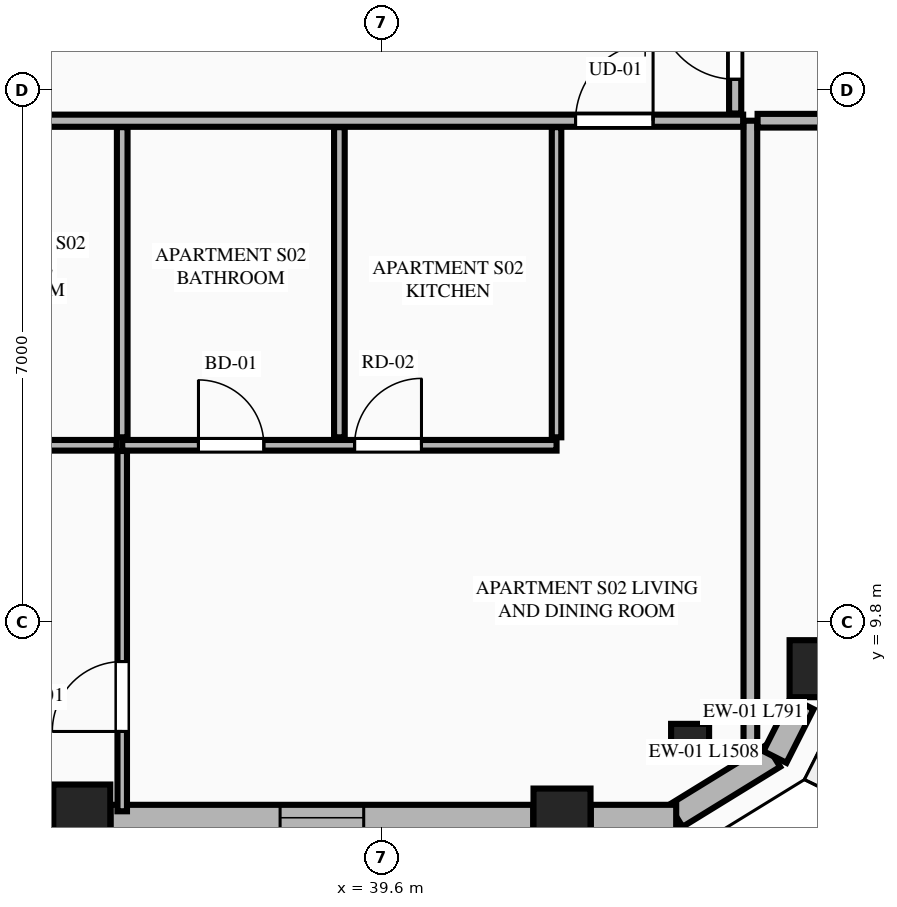
"""IFC4 building model, lengths in metres.
Left out: names, types, materials, properties, quantities, classifications, styles, units other than length and angle.
Written with IfcOpenShell. Run it as: python <this file> out.ifc"""

import sys

from ifc_helpers import new_model, si_unit, direction, frame, frame_2d, origin, origin_2d, place, context, subcontext, project, spatial, rectangle, extrude, element, fill, save


model = new_model("IFC4")
c1 = context("Model", 3, precision=1e-05, world=origin(), true_north=direction((0.0, 1.0)))
c2 = subcontext(c1, "Body", "Model", "MODEL_VIEW")
j1 = project(units=[si_unit("LENGTHUNIT", "METRE"), si_unit("PLANEANGLEUNIT", "RADIAN")], contexts=[c1])
p1 = place(None, origin())
s1 = spatial("IfcSite", under=j1, at=p1, CompositionType="ELEMENT")
p2 = place(p1, origin())
s2 = spatial("IfcBuilding", under=s1, at=p2, CompositionType="ELEMENT")
p3 = place(p2, frame((0.0, 0.0, 230.65)))
s3 = spatial("IfcBuildingStorey", under=s2, at=p3, CompositionType="ELEMENT", Elevation=230.65)
for number, where, z_axis, x_axis in (
    (1, (35.654, 7.292, 0.0), (0.0, 0.0, 1.0), (1.0, 0.0, 0.0)),
    (2, (41.972, 7.239, 0.0), (0.0, 0.0, 1.0), (1.0, 0.0, 0.0)),
    (3, (45.341, 9.191, 0.0), (0.0, 0.0, 1.0), (1.0, 0.0, 0.0)),
):
    element("IfcColumn", number, at=place(p3, frame(where, z_axis=z_axis, x_axis=x_axis)), inside=s3, PredefinedType="COLUMN", context=c2, shape_type="SweptSolid", body=[
        extrude(rectangle(XDim=0.75, YDim=0.75, at=origin_2d()), origin(), (0.0, 0.0, 1.0), 3.65),
    ])
p4 = place(p3, frame((43.657, 8.215, 0.0), z_axis=(0.0, 0.0, 1.0), x_axis=(0.865256437757, 0.501329529272, 0.0)))
e4 = element("IfcColumn", 4, at=p4, inside=s3, PredefinedType="PILASTER", context=c2, shape_type="SweptSolid", body=[
    extrude(rectangle(XDim=0.5, YDim=0.35, at=origin_2d()), origin(), (0.0, 0.0, 1.0), 3.65),
])
p5 = place(p3, frame((43.469, 7.255, 0.0), z_axis=(0.0, 0.0, 1.0), x_axis=(0.851680557619, 0.52406128246, 0.0)))
e5 = element("IfcWall", 5, at=p5, inside=s3, PredefinedType="STANDARD", context=c2, shape_type="SweptSolid", body=[
    extrude(rectangle(XDim=1.508, YDim=0.34, at=frame_2d((0.754, 0.0))), origin(), (0.0, 0.0, 1.0), 3.45),
])
p6 = place(p3, frame((29.525, 7.23, 0.0), z_axis=(0.0, 0.0, 1.0), x_axis=(1.0, 0.0, 0.0)))
e6 = element("IfcWall", 6, at=p6, inside=s3, PredefinedType="STANDARD", context=c2, shape_type="SweptSolid", body=[
    extrude(rectangle(XDim=5.75, YDim=0.34, at=frame_2d((2.875, 0.0))), origin(), (0.0, 0.0, 1.0), 2.983),
])
p7 = place(p6, frame((2.325, 0.0, 0.0)))
e7 = element("IfcOpeningElement", 7, at=p7, cuts=e6, PredefinedType="OPENING", context=c2, shape_type="SweptSolid", body=[
    extrude(rectangle(XDim=1.1, YDim=2.25, at=frame_2d((0.55, 1.125))), frame((0.0, 0.18, 0.0), z_axis=(0.0, -1.0, 0.0), x_axis=(1.0, 0.0, 0.0)), (0.0, 0.0, 1.0), 0.36),
])
p8 = place(p3, frame((36.033, 7.23, 0.0), z_axis=(0.0, 0.0, 1.0), x_axis=(1.0, 0.0, 0.0)))
e8 = element("IfcWall", 8, at=p8, inside=s3, PredefinedType="STANDARD", context=c2, shape_type="SweptSolid", body=[
    extrude(rectangle(XDim=5.56, YDim=0.34, at=frame_2d((2.78, 0.0))), origin(), (0.0, 0.0, 1.0), 2.983),
])
p9 = place(p8, frame((2.23, 0.0, 0.75)))
e9 = element("IfcOpeningElement", 9, at=p9, cuts=e8, PredefinedType="OPENING", context=c2, shape_type="SweptSolid", body=[
    extrude(rectangle(XDim=1.1, YDim=2.0, at=frame_2d((0.55, 1.0))), frame((0.0, 0.18, 0.0), z_axis=(0.0, -1.0, 0.0), x_axis=(1.0, 0.0, 0.0)), (0.0, 0.0, 1.0), 0.36),
])
p10 = place(p3, frame((42.351, 7.23, 0.0), z_axis=(0.0, 0.0, 1.0), x_axis=(1.0, 0.0, 0.0)))
e10 = element("IfcWall", 10, at=p10, inside=s3, PredefinedType="STANDARD", context=c2, shape_type="SweptSolid", body=[
    extrude(rectangle(XDim=1.123, YDim=0.34, at=frame_2d((0.562, 0.0))), origin(), (0.0, 0.0, 1.0), 3.45),
])
p11 = place(p3, frame((44.773, 8.029, 0.0), z_axis=(0.0, 0.0, 1.0), x_axis=(0.451159191899, 0.892443490404, 0.0)))
e11 = element("IfcWall", 11, at=p11, inside=s3, PredefinedType="STANDARD", context=c2, shape_type="SweptSolid", body=[
    extrude(rectangle(XDim=0.791, YDim=0.34, at=frame_2d((0.396, 0.0))), origin(), (0.0, 0.0, 1.0), 3.45),
])
p12 = place(p3, frame((44.45, 8.119, 0.0), z_axis=(0.0, 0.0, 1.0), x_axis=(0.0, 1.0, 0.0)))
e12 = element("IfcWall", 12, at=p12, inside=s3, PredefinedType="PARTITIONING", context=c2, shape_type="SweptSolid", body=[
    extrude(rectangle(XDim=8.281, YDim=0.18, at=frame_2d((4.141, 0.0))), origin(), (0.0, 0.0, 1.0), 3.45),
])
p13 = place(p3, frame((29.241, 16.4, 0.0), z_axis=(0.0, 0.0, 1.0), x_axis=(1.0, 0.0, 0.0)))
e13 = element("IfcWall", 13, at=p13, inside=s3, PredefinedType="PARTITIONING", context=c2, shape_type="SweptSolid", body=[
    extrude(rectangle(XDim=15.114, YDim=0.16, at=frame_2d((7.557, 0.0))), origin(), (0.0, 0.0, 1.0), 3.45),
])
p14 = place(p13, frame((12.909, 0.0, 0.0)))
e14 = element("IfcOpeningElement", 14, at=p14, cuts=e13, PredefinedType="OPENING", context=c2, shape_type="SweptSolid", body=[
    extrude(rectangle(XDim=1.02, YDim=2.25, at=frame_2d((0.51, 1.125))), frame((0.0, 0.09, 0.0), z_axis=(0.0, -1.0, 0.0), x_axis=(1.0, 0.0, 0.0)), (0.0, 0.0, 1.0), 0.18),
])
p15 = place(p3, frame((41.9, 12.235, 0.0), z_axis=(0.0, 0.0, 1.0), x_axis=(0.0, 1.0, 0.0)))
e15 = element("IfcWall", 15, at=p15, inside=s3, PredefinedType="PARTITIONING", context=c2, shape_type="SweptSolid", body=[
    extrude(rectangle(XDim=4.08, YDim=0.125, at=frame_2d((2.04, 0.0))), origin(), (0.0, 0.0, 1.0), 2.907),
])
p16 = place(p3, frame((36.186, 12.13, 0.0), z_axis=(0.0, 0.0, 1.0), x_axis=(1.0, 0.0, 0.0)))
e16 = element("IfcWall", 16, at=p16, inside=s3, PredefinedType="PLUMBINGWALL", context=c2, shape_type="SweptSolid", body=[
    extrude(rectangle(XDim=5.714, YDim=0.14, at=frame_2d((2.857, 0.0))), origin(), (0.0, 0.0, 1.0), 3.45),
])
p17 = place(p16, frame((1.003, 0.0, 0.0)))
e17 = element("IfcOpeningElement", 17, at=p17, cuts=e16, PredefinedType="OPENING", context=c2, shape_type="SweptSolid", body=[
    extrude(rectangle(XDim=0.86, YDim=2.1, at=frame_2d((0.43, 1.05))), frame((0.0, 0.08, 0.0), z_axis=(0.0, -1.0, 0.0), x_axis=(1.0, 0.0, 0.0)), (0.0, 0.0, 1.0), 0.16),
])
p18 = place(p16, frame((3.057, 0.0, 0.0)))
e18 = element("IfcOpeningElement", 18, at=p18, cuts=e16, PredefinedType="OPENING", context=c2, shape_type="SweptSolid", body=[
    extrude(rectangle(XDim=0.88, YDim=2.15, at=frame_2d((0.44, 1.075))), frame((0.0, 0.08, 0.0), z_axis=(0.0, -1.0, 0.0), x_axis=(1.0, 0.0, 0.0)), (0.0, 0.0, 1.0), 0.16),
])
p19 = place(p3, frame((29.241, 12.13, 0.0), z_axis=(0.0, 0.0, 1.0), x_axis=(1.0, 0.0, 0.0)))
e19 = element("IfcWall", 19, at=p19, inside=s3, PredefinedType="PLUMBINGWALL", context=c2, shape_type="SweptSolid", body=[
    extrude(rectangle(XDim=6.87, YDim=0.14, at=frame_2d((3.435, 0.0))), origin(), (0.0, 0.0, 1.0), 3.45),
])
p20 = place(p19, frame((0.28, 0.0, 0.0)))
e20 = element("IfcOpeningElement", 20, at=p20, cuts=e19, PredefinedType="OPENING", context=c2, shape_type="SweptSolid", body=[
    extrude(rectangle(XDim=0.88, YDim=2.15, at=frame_2d((0.44, 1.075))), frame((0.0, 0.08, 0.0), z_axis=(0.0, -1.0, 0.0), x_axis=(1.0, 0.0, 0.0)), (0.0, 0.0, 1.0), 0.16),
])
p21 = place(p19, frame((4.352, 0.0, 0.0)))
e21 = element("IfcOpeningElement", 21, at=p21, cuts=e19, PredefinedType="OPENING", context=c2, shape_type="SweptSolid", body=[
    extrude(rectangle(XDim=0.86, YDim=2.1, at=frame_2d((0.43, 1.05))), frame((0.0, 0.08, 0.0), z_axis=(0.0, -1.0, 0.0), x_axis=(1.0, 0.0, 0.0)), (0.0, 0.0, 1.0), 0.16),
])
for number, where, z_axis, x_axis in (
    (22, (39.043, 12.235, 0.0), (0.0, 0.0, 1.0), (0.0, 1.0, 0.0)),
    (23, (36.186, 12.235, 0.0), (0.0, 0.0, 1.0), (0.0, 1.0, 0.0)),
):
    element("IfcWall", number, at=place(p3, frame(where, z_axis=z_axis, x_axis=x_axis)), inside=s3, PredefinedType="PLUMBINGWALL", context=c2, shape_type="SweptSolid", body=[
        extrude(rectangle(XDim=4.08, YDim=0.14, at=frame_2d((2.04, 0.0))), origin(), (0.0, 0.0, 1.0), 3.45),
    ])
p22 = place(p3, frame((36.186, 7.315, 0.0), z_axis=(0.0, 0.0, 1.0), x_axis=(0.0, 1.0, 0.0)))
e24 = element("IfcWall", 24, at=p22, inside=s3, PredefinedType="PARTITIONING", context=c2, shape_type="SweptSolid", body=[
    extrude(rectangle(XDim=4.74, YDim=0.125, at=frame_2d((2.37, 0.0))), origin(), (0.0, 0.0, 1.0), 3.45),
])
p23 = place(p22, frame((1.05, 0.0, 0.0)))
e25 = element("IfcOpeningElement", 25, at=p23, cuts=e24, PredefinedType="OPENING", context=c2, shape_type="SweptSolid", body=[
    extrude(rectangle(XDim=0.92, YDim=2.15, at=frame_2d((0.46, 1.075))), frame((0.0, 0.073, 0.0), z_axis=(0.0, -1.0, 0.0), x_axis=(1.0, 0.0, 0.0)), (0.0, 0.0, 1.0), 0.145),
])
p24 = place(p3, frame((44.545, 16.4, 0.0), z_axis=(0.0, 0.0, 1.0), x_axis=(1.0, 0.0, 0.0)))
e26 = element("IfcWall", 26, at=p24, inside=s3, PredefinedType="PARTITIONING", context=c2, shape_type="SweptSolid", body=[
    extrude(rectangle(XDim=4.221, YDim=0.18, at=frame_2d((2.111, 0.0))), origin(), (0.0, 0.0, 1.0), 3.45),
])
p25 = place(p3, frame((44.25, 16.495, 0.0), z_axis=(0.0, 0.0, 1.0), x_axis=(0.0, 1.0, 0.0)))
e27 = element("IfcWall", 27, at=p25, inside=s3, PredefinedType="PARTITIONING", context=c2, shape_type="SweptSolid", body=[
    extrude(rectangle(XDim=18.41, YDim=0.16, at=frame_2d((9.205, 0.0))), origin(), (0.0, 0.0, 1.0), 3.137),
])
p26 = place(p25, frame((0.45, 0.0, 0.0)))
e28 = element("IfcOpeningElement", 28, at=p26, cuts=e27, PredefinedType="OPENING", context=c2, shape_type="SweptSolid", body=[
    extrude(rectangle(XDim=1.02, YDim=2.25, at=frame_2d((0.51, 1.125))), frame((0.0, 0.09, 0.0), z_axis=(0.0, -1.0, 0.0), x_axis=(1.0, 0.0, 0.0)), (0.0, 0.0, 1.0), 0.18),
])
p27 = place(p9, origin())
e29 = element("IfcWindow", 29, at=p27, inside=s3, PartitioningType="SINGLE_PANEL", PredefinedType="WINDOW", context=c2, shape_type="SweptSolid", body=[
    extrude(rectangle(XDim=1.1, YDim=2.0, at=frame_2d((0.55, 1.0))), frame((0.0, 0.03, 0.0), z_axis=(0.0, -1.0, 0.0), x_axis=(1.0, 0.0, 0.0)), (0.0, 0.0, 1.0), 0.06),
])
fill(e9, e29)
p28 = place(p17, origin())
e30 = element("IfcDoor", 30, at=p28, inside=s3, OperationType="SINGLE_SWING_LEFT", PredefinedType="DOOR", context=c2, shape_type="SweptSolid", body=[
    extrude(rectangle(XDim=0.86, YDim=2.1, at=frame_2d((0.43, 1.05))), frame((0.0, 0.025, 0.0), z_axis=(0.0, -1.0, 0.0), x_axis=(1.0, 0.0, 0.0)), (0.0, 0.0, 1.0), 0.05),
])
fill(e17, e30)
p29 = place(p14, origin())
e31 = element("IfcDoor", 31, at=p29, inside=s3, OperationType="SINGLE_SWING_RIGHT", PredefinedType="DOOR", context=c2, shape_type="SweptSolid", body=[
    extrude(rectangle(XDim=1.02, YDim=2.25, at=frame_2d((0.51, 1.125))), frame((0.0, 0.025, 0.0), z_axis=(0.0, -1.0, 0.0), x_axis=(1.0, 0.0, 0.0)), (0.0, 0.0, 1.0), 0.05),
])
fill(e14, e31)
p30 = place(p18, origin())
e32 = element("IfcDoor", 32, at=p30, inside=s3, OperationType="SINGLE_SWING_RIGHT", PredefinedType="DOOR", context=c2, shape_type="SweptSolid", body=[
    extrude(rectangle(XDim=0.88, YDim=2.15, at=frame_2d((0.44, 1.075))), frame((0.0, 0.025, 0.0), z_axis=(0.0, -1.0, 0.0), x_axis=(1.0, 0.0, 0.0)), (0.0, 0.0, 1.0), 0.05),
])
fill(e18, e32)
p31 = place(p23, origin())
e33 = element("IfcDoor", 33, at=p31, inside=s3, OperationType="SINGLE_SWING_LEFT", PredefinedType="DOOR", context=c2, shape_type="SweptSolid", body=[
    extrude(rectangle(XDim=0.92, YDim=2.15, at=frame_2d((0.46, 1.075))), frame((0.0, 0.025, 0.0), z_axis=(0.0, -1.0, 0.0), x_axis=(1.0, 0.0, 0.0)), (0.0, 0.0, 1.0), 0.05),
])
fill(e25, e33)
p32 = place(p26, origin())
e34 = element("IfcDoor", 34, at=p32, inside=s3, OperationType="SINGLE_SWING_RIGHT", PredefinedType="DOOR", context=c2, shape_type="SweptSolid", body=[
    extrude(rectangle(XDim=1.02, YDim=2.25, at=frame_2d((0.51, 1.125))), frame((0.0, 0.025, 0.0), z_axis=(0.0, -1.0, 0.0), x_axis=(1.0, 0.0, 0.0)), (0.0, 0.0, 1.0), 0.05),
])
fill(e28, e34)
save(model, sys.argv[1])
